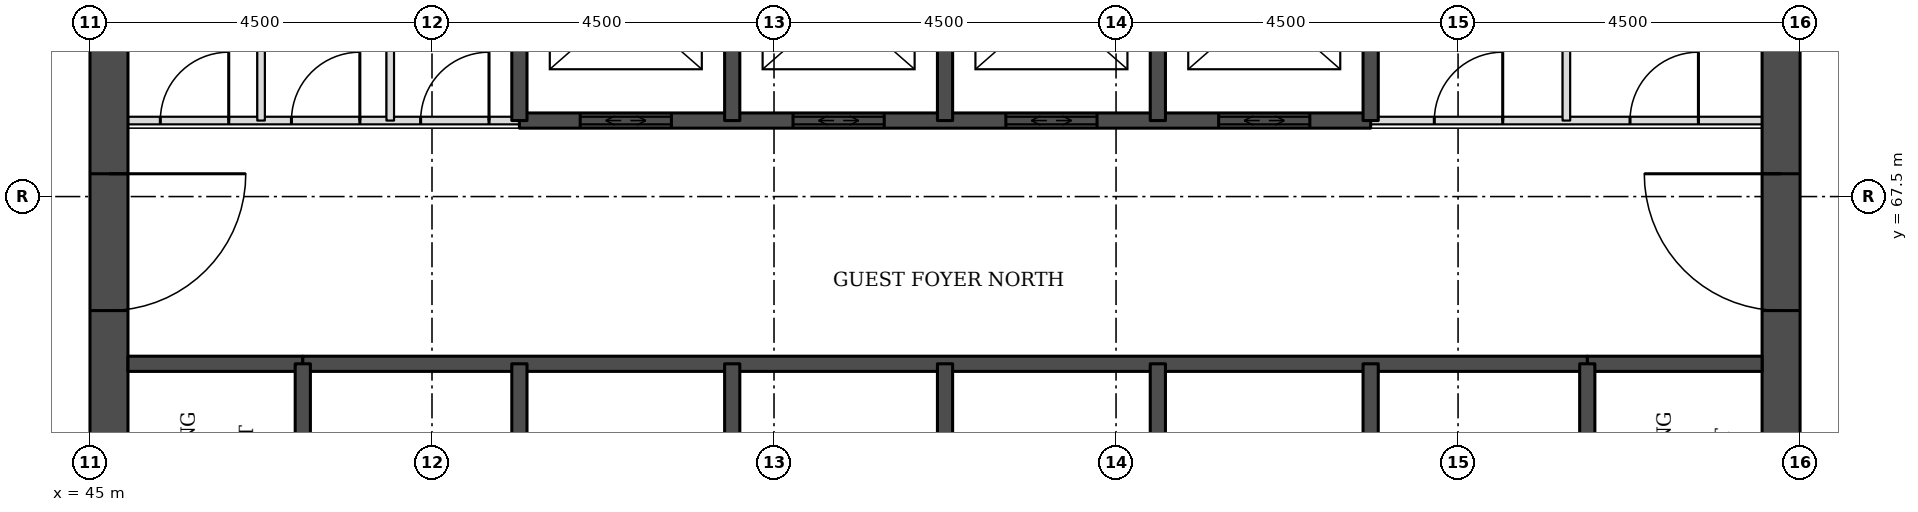
"""IFC4 building model, lengths in metres.
Left out: names, types, materials, properties, quantities, classifications, styles, units other than length and angle.
Written with IfcOpenShell. Run it as: python <this file> out.ifc"""

import sys

from ifc_helpers import new_model, si_unit, direction, frame, frame_2d, origin, place, context, subcontext, project, spatial, rectangle, extrude, element, fill, save


model = new_model("IFC4")
c1 = context("Model", 3, precision=1e-05, world=origin(), true_north=direction((0.0, 1.0)))
c2 = subcontext(c1, "Body", "Model", "MODEL_VIEW")
j1 = project(units=[si_unit("LENGTHUNIT", "METRE"), si_unit("PLANEANGLEUNIT", "RADIAN")], contexts=[c1])
p1 = place(None, origin())
s1 = spatial("IfcSite", under=j1, at=p1, CompositionType="ELEMENT")
p2 = place(p1, origin())
s2 = spatial("IfcBuilding", under=s1, at=p2, CompositionType="ELEMENT")
p3 = place(p2, frame((0.0, 0.0, 49.5)))
s3 = spatial("IfcBuildingStorey", under=s2, at=p3, CompositionType="ELEMENT", Elevation=49.5)
p4 = place(p3, frame((45.25, 49.5, 0.0), z_axis=(0.0, 0.0, 1.0), x_axis=(0.0, 1.0, 0.0)))
e1 = element("IfcWall", 1, at=p4, inside=s3, PredefinedType="SHEAR", context=c2, shape_type="SweptSolid", body=[
    extrude(rectangle(XDim=22.5, YDim=0.5, at=frame_2d((11.25, 0.0))), origin(), (0.0, 0.0, 1.0), 3.3),
])
p5 = place(p4, frame((4.2, 0.0, 0.0)))
e2 = element("IfcOpeningElement", 2, at=p5, cuts=e1, PredefinedType="OPENING", context=c2, shape_type="SweptSolid", body=[
    extrude(rectangle(XDim=1.8, YDim=2.1, at=frame_2d((0.9, 1.05))), frame((0.0, 0.26, 0.0), z_axis=(0.0, -1.0, 0.0), x_axis=(1.0, 0.0, 0.0)), (0.0, 0.0, 1.0), 0.52),
])
p6 = place(p4, frame((6.9, 0.0, 0.0)))
e3 = element("IfcOpeningElement", 3, at=p6, cuts=e1, PredefinedType="OPENING", context=c2, shape_type="SweptSolid", body=[
    extrude(rectangle(XDim=1.1, YDim=2.1, at=frame_2d((0.55, 1.05))), frame((0.0, 0.26, 0.0), z_axis=(0.0, -1.0, 0.0), x_axis=(1.0, 0.0, 0.0)), (0.0, 0.0, 1.0), 0.52),
])
p7 = place(p4, frame((13.6, 0.0, 0.0)))
e4 = element("IfcOpeningElement", 4, at=p7, cuts=e1, PredefinedType="OPENING", context=c2, shape_type="SweptSolid", body=[
    extrude(rectangle(XDim=1.1, YDim=2.1, at=frame_2d((0.55, 1.05))), frame((0.0, 0.26, 0.0), z_axis=(0.0, -1.0, 0.0), x_axis=(1.0, 0.0, 0.0)), (0.0, 0.0, 1.0), 0.52),
])
p8 = place(p4, frame((16.5, 0.0, 0.0)))
e5 = element("IfcOpeningElement", 5, at=p8, cuts=e1, PredefinedType="OPENING", context=c2, shape_type="SweptSolid", body=[
    extrude(rectangle(XDim=1.8, YDim=2.1, at=frame_2d((0.9, 1.05))), frame((0.0, 0.26, 0.0), z_axis=(0.0, -1.0, 0.0), x_axis=(1.0, 0.0, 0.0)), (0.0, 0.0, 1.0), 0.52),
])
p9 = place(p3, frame((67.25, 49.5, 0.0), z_axis=(0.0, 0.0, 1.0), x_axis=(0.0, 1.0, 0.0)))
e6 = element("IfcWall", 6, at=p9, inside=s3, PredefinedType="SHEAR", context=c2, shape_type="SweptSolid", body=[
    extrude(rectangle(XDim=22.5, YDim=0.5, at=frame_2d((11.25, 0.0))), origin(), (0.0, 0.0, 1.0), 3.3),
])
p10 = place(p9, frame((4.2, 0.0, 0.0)))
e7 = element("IfcOpeningElement", 7, at=p10, cuts=e6, PredefinedType="OPENING", context=c2, shape_type="SweptSolid", body=[
    extrude(rectangle(XDim=1.8, YDim=2.1, at=frame_2d((0.9, 1.05))), frame((0.0, 0.26, 0.0), z_axis=(0.0, -1.0, 0.0), x_axis=(1.0, 0.0, 0.0)), (0.0, 0.0, 1.0), 0.52),
])
p11 = place(p9, frame((6.9, 0.0, 0.0)))
e8 = element("IfcOpeningElement", 8, at=p11, cuts=e6, PredefinedType="OPENING", context=c2, shape_type="SweptSolid", body=[
    extrude(rectangle(XDim=1.1, YDim=2.1, at=frame_2d((0.55, 1.05))), frame((0.0, 0.26, 0.0), z_axis=(0.0, -1.0, 0.0), x_axis=(1.0, 0.0, 0.0)), (0.0, 0.0, 1.0), 0.52),
])
p12 = place(p9, frame((13.6, 0.0, 0.0)))
e9 = element("IfcOpeningElement", 9, at=p12, cuts=e6, PredefinedType="OPENING", context=c2, shape_type="SweptSolid", body=[
    extrude(rectangle(XDim=1.1, YDim=2.1, at=frame_2d((0.55, 1.05))), frame((0.0, 0.26, 0.0), z_axis=(0.0, -1.0, 0.0), x_axis=(1.0, 0.0, 0.0)), (0.0, 0.0, 1.0), 0.52),
])
p13 = place(p9, frame((16.5, 0.0, 0.0)))
e10 = element("IfcOpeningElement", 10, at=p13, cuts=e6, PredefinedType="OPENING", context=c2, shape_type="SweptSolid", body=[
    extrude(rectangle(XDim=1.8, YDim=2.1, at=frame_2d((0.9, 1.05))), frame((0.0, 0.26, 0.0), z_axis=(0.0, -1.0, 0.0), x_axis=(1.0, 0.0, 0.0)), (0.0, 0.0, 1.0), 0.52),
])
for number, where, z_axis, x_axis in (
    (11, (45.5, 65.3, 0.0), (0.0, 0.0, 1.0), (1.0, 0.0, 0.0)),
    (12, (64.7, 65.3, 0.0), (0.0, 0.0, 1.0), (1.0, 0.0, 0.0)),
):
    element("IfcWall", number, at=place(p3, frame(where, z_axis=z_axis, x_axis=x_axis)), inside=s3, PredefinedType="SOLIDWALL", context=c2, shape_type="SweptSolid", body=[
        extrude(rectangle(XDim=2.3, YDim=0.2, at=frame_2d((1.15, 0.0))), origin(), (0.0, 0.0, 1.0), 3.08),
    ])
p14 = place(p3, frame((47.8, 65.3, 0.0), z_axis=(0.0, 0.0, 1.0), x_axis=(1.0, 0.0, 0.0)))
e13 = element("IfcWall", 13, at=p14, inside=s3, PredefinedType="SOLIDWALL", context=c2, shape_type="SweptSolid", body=[
    extrude(rectangle(XDim=16.9, YDim=0.2, at=frame_2d((8.45, 0.0))), origin(), (0.0, 0.0, 1.0), 3.08),
])
p15 = place(p3, frame((45.5, 68.5, 0.0), z_axis=(0.0, 0.0, 1.0), x_axis=(1.0, 0.0, 0.0)))
e14 = element("IfcWall", 14, at=p15, inside=s3, PredefinedType="PARTITIONING", context=c2, shape_type="SweptSolid", body=[
    extrude(rectangle(XDim=5.15, YDim=0.1, at=frame_2d((2.575, 0.0))), origin(), (0.0, 0.0, 1.0), 3.08),
])
p16 = place(p15, frame((0.426, 0.0, 0.0)))
e15 = element("IfcOpeningElement", 15, at=p16, cuts=e14, PredefinedType="OPENING", context=c2, shape_type="SweptSolid", body=[
    extrude(rectangle(XDim=0.9, YDim=2.1, at=frame_2d((0.45, 1.05))), frame((0.0, 0.06, 0.0), z_axis=(0.0, -1.0, 0.0), x_axis=(1.0, 0.0, 0.0)), (0.0, 0.0, 1.0), 0.12),
])
p17 = place(p15, frame((2.151, 0.0, 0.0)))
e16 = element("IfcOpeningElement", 16, at=p17, cuts=e14, PredefinedType="OPENING", context=c2, shape_type="SweptSolid", body=[
    extrude(rectangle(XDim=0.9, YDim=2.1, at=frame_2d((0.45, 1.05))), frame((0.0, 0.06, 0.0), z_axis=(0.0, -1.0, 0.0), x_axis=(1.0, 0.0, 0.0)), (0.0, 0.0, 1.0), 0.12),
])
p18 = place(p15, frame((3.85, 0.0, 0.0)))
e17 = element("IfcOpeningElement", 17, at=p18, cuts=e14, PredefinedType="OPENING", context=c2, shape_type="SweptSolid", body=[
    extrude(rectangle(XDim=0.9, YDim=2.1, at=frame_2d((0.45, 1.05))), frame((0.0, 0.06, 0.0), z_axis=(0.0, -1.0, 0.0), x_axis=(1.0, 0.0, 0.0)), (0.0, 0.0, 1.0), 0.12),
])
p19 = place(p3, frame((61.85, 68.5, 0.0), z_axis=(0.0, 0.0, 1.0), x_axis=(1.0, 0.0, 0.0)))
e18 = element("IfcWall", 18, at=p19, inside=s3, PredefinedType="PARTITIONING", context=c2, shape_type="SweptSolid", body=[
    extrude(rectangle(XDim=5.15, YDim=0.1, at=frame_2d((2.575, 0.0))), origin(), (0.0, 0.0, 1.0), 3.08),
])
p20 = place(p19, frame((3.413, 0.0, 0.0)))
e19 = element("IfcOpeningElement", 19, at=p20, cuts=e18, PredefinedType="OPENING", context=c2, shape_type="SweptSolid", body=[
    extrude(rectangle(XDim=0.9, YDim=2.1, at=frame_2d((0.45, 1.05))), frame((0.0, 0.06, 0.0), z_axis=(0.0, -1.0, 0.0), x_axis=(1.0, 0.0, 0.0)), (0.0, 0.0, 1.0), 0.12),
])
p21 = place(p19, frame((0.837, 0.0, 0.0)))
e20 = element("IfcOpeningElement", 20, at=p21, cuts=e18, PredefinedType="OPENING", context=c2, shape_type="SweptSolid", body=[
    extrude(rectangle(XDim=0.9, YDim=2.1, at=frame_2d((0.45, 1.05))), frame((0.0, 0.06, 0.0), z_axis=(0.0, -1.0, 0.0), x_axis=(1.0, 0.0, 0.0)), (0.0, 0.0, 1.0), 0.12),
])
p22 = place(p3, frame((50.65, 68.5, 0.0), z_axis=(0.0, 0.0, 1.0), x_axis=(1.0, 0.0, 0.0)))
e21 = element("IfcWall", 21, at=p22, inside=s3, PredefinedType="SOLIDWALL", context=c2, shape_type="SweptSolid", body=[
    extrude(rectangle(XDim=11.2, YDim=0.2, at=frame_2d((5.6, 0.0))), origin(), (0.0, 0.0, 1.0), 3.08),
])
p23 = place(p22, frame((0.8, 0.0, 0.0)))
e22 = element("IfcOpeningElement", 22, at=p23, cuts=e21, PredefinedType="OPENING", context=c2, shape_type="SweptSolid", body=[
    extrude(rectangle(XDim=1.2, YDim=2.1, at=frame_2d((0.6, 1.05))), frame((0.0, 0.11, 0.0), z_axis=(0.0, -1.0, 0.0), x_axis=(1.0, 0.0, 0.0)), (0.0, 0.0, 1.0), 0.22),
])
p24 = place(p22, frame((3.6, 0.0, 0.0)))
e23 = element("IfcOpeningElement", 23, at=p24, cuts=e21, PredefinedType="OPENING", context=c2, shape_type="SweptSolid", body=[
    extrude(rectangle(XDim=1.2, YDim=2.1, at=frame_2d((0.6, 1.05))), frame((0.0, 0.11, 0.0), z_axis=(0.0, -1.0, 0.0), x_axis=(1.0, 0.0, 0.0)), (0.0, 0.0, 1.0), 0.22),
])
p25 = place(p22, frame((6.4, 0.0, 0.0)))
e24 = element("IfcOpeningElement", 24, at=p25, cuts=e21, PredefinedType="OPENING", context=c2, shape_type="SweptSolid", body=[
    extrude(rectangle(XDim=1.2, YDim=2.1, at=frame_2d((0.6, 1.05))), frame((0.0, 0.11, 0.0), z_axis=(0.0, -1.0, 0.0), x_axis=(1.0, 0.0, 0.0)), (0.0, 0.0, 1.0), 0.22),
])
p26 = place(p22, frame((9.2, 0.0, 0.0)))
e25 = element("IfcOpeningElement", 25, at=p26, cuts=e21, PredefinedType="OPENING", context=c2, shape_type="SweptSolid", body=[
    extrude(rectangle(XDim=1.2, YDim=2.1, at=frame_2d((0.6, 1.05))), frame((0.0, 0.11, 0.0), z_axis=(0.0, -1.0, 0.0), x_axis=(1.0, 0.0, 0.0)), (0.0, 0.0, 1.0), 0.22),
])
p27 = place(p3, frame((47.251, 68.5, 0.0), z_axis=(0.0, 0.0, 1.0), x_axis=(0.0, 1.0, 0.0)))
e26 = element("IfcWall", 26, at=p27, inside=s3, PredefinedType="PARTITIONING", context=c2, shape_type="SweptSolid", body=[
    extrude(rectangle(XDim=3.0, YDim=0.1, at=frame_2d((1.5, 0.0))), origin(), (0.0, 0.0, 1.0), 3.08),
])
p28 = place(p3, frame((47.8, 62.0, 0.0), z_axis=(0.0, 0.0, 1.0), x_axis=(0.0, 1.0, 0.0)))
e27 = element("IfcWall", 27, at=p28, inside=s3, PredefinedType="SOLIDWALL", context=c2, shape_type="SweptSolid", body=[
    extrude(rectangle(XDim=3.3, YDim=0.2, at=frame_2d((1.65, 0.0))), origin(), (0.0, 0.0, 1.0), 3.08),
])
p29 = place(p28, frame((1.1, 0.0, 0.0)))
e28 = element("IfcOpeningElement", 28, at=p29, cuts=e27, PredefinedType="OPENING", context=c2, shape_type="SweptSolid", body=[
    extrude(rectangle(XDim=1.1, YDim=2.1, at=frame_2d((0.55, 1.05))), frame((0.0, 0.11, 0.0), z_axis=(0.0, -1.0, 0.0), x_axis=(1.0, 0.0, 0.0)), (0.0, 0.0, 1.0), 0.22),
])
p30 = place(p3, frame((48.95, 68.5, 0.0), z_axis=(0.0, 0.0, 1.0), x_axis=(0.0, 1.0, 0.0)))
e29 = element("IfcWall", 29, at=p30, inside=s3, PredefinedType="PARTITIONING", context=c2, shape_type="SweptSolid", body=[
    extrude(rectangle(XDim=3.0, YDim=0.1, at=frame_2d((1.5, 0.0))), origin(), (0.0, 0.0, 1.0), 3.08),
])
p31 = place(p3, frame((50.65, 62.0, 0.0), z_axis=(0.0, 0.0, 1.0), x_axis=(0.0, 1.0, 0.0)))
e30 = element("IfcWall", 30, at=p31, inside=s3, PredefinedType="SOLIDWALL", context=c2, shape_type="SweptSolid", body=[
    extrude(rectangle(XDim=3.3, YDim=0.2, at=frame_2d((1.65, 0.0))), origin(), (0.0, 0.0, 1.0), 3.08),
])
p32 = place(p3, frame((50.65, 68.5, 0.0), z_axis=(0.0, 0.0, 1.0), x_axis=(0.0, 1.0, 0.0)))
e31 = element("IfcWall", 31, at=p32, inside=s3, PredefinedType="SOLIDWALL", context=c2, shape_type="SweptSolid", body=[
    extrude(rectangle(XDim=3.0, YDim=0.2, at=frame_2d((1.5, 0.0))), origin(), (0.0, 0.0, 1.0), 3.08),
])
p33 = place(p3, frame((53.45, 62.5, 0.0), z_axis=(0.0, 0.0, 1.0), x_axis=(0.0, 1.0, 0.0)))
e32 = element("IfcWall", 32, at=p33, inside=s3, PredefinedType="SOLIDWALL", context=c2, shape_type="SweptSolid", body=[
    extrude(rectangle(XDim=2.8, YDim=0.2, at=frame_2d((1.4, 0.0))), origin(), (0.0, 0.0, 1.0), 3.08),
])
p34 = place(p3, frame((53.45, 68.5, 0.0), z_axis=(0.0, 0.0, 1.0), x_axis=(0.0, 1.0, 0.0)))
e33 = element("IfcWall", 33, at=p34, inside=s3, PredefinedType="SOLIDWALL", context=c2, shape_type="SweptSolid", body=[
    extrude(rectangle(XDim=3.0, YDim=0.2, at=frame_2d((1.5, 0.0))), origin(), (0.0, 0.0, 1.0), 3.08),
])
p35 = place(p3, frame((56.25, 62.5, 0.0), z_axis=(0.0, 0.0, 1.0), x_axis=(0.0, 1.0, 0.0)))
e34 = element("IfcWall", 34, at=p35, inside=s3, PredefinedType="SOLIDWALL", context=c2, shape_type="SweptSolid", body=[
    extrude(rectangle(XDim=2.8, YDim=0.2, at=frame_2d((1.4, 0.0))), origin(), (0.0, 0.0, 1.0), 3.08),
])
p36 = place(p3, frame((56.25, 68.5, 0.0), z_axis=(0.0, 0.0, 1.0), x_axis=(0.0, 1.0, 0.0)))
e35 = element("IfcWall", 35, at=p36, inside=s3, PredefinedType="SOLIDWALL", context=c2, shape_type="SweptSolid", body=[
    extrude(rectangle(XDim=3.0, YDim=0.2, at=frame_2d((1.5, 0.0))), origin(), (0.0, 0.0, 1.0), 3.08),
])
p37 = place(p3, frame((59.05, 62.5, 0.0), z_axis=(0.0, 0.0, 1.0), x_axis=(0.0, 1.0, 0.0)))
e36 = element("IfcWall", 36, at=p37, inside=s3, PredefinedType="SOLIDWALL", context=c2, shape_type="SweptSolid", body=[
    extrude(rectangle(XDim=2.8, YDim=0.2, at=frame_2d((1.4, 0.0))), origin(), (0.0, 0.0, 1.0), 3.08),
])
p38 = place(p3, frame((59.05, 68.5, 0.0), z_axis=(0.0, 0.0, 1.0), x_axis=(0.0, 1.0, 0.0)))
e37 = element("IfcWall", 37, at=p38, inside=s3, PredefinedType="SOLIDWALL", context=c2, shape_type="SweptSolid", body=[
    extrude(rectangle(XDim=3.0, YDim=0.2, at=frame_2d((1.5, 0.0))), origin(), (0.0, 0.0, 1.0), 3.08),
])
p39 = place(p3, frame((61.85, 62.0, 0.0), z_axis=(0.0, 0.0, 1.0), x_axis=(0.0, 1.0, 0.0)))
e38 = element("IfcWall", 38, at=p39, inside=s3, PredefinedType="SOLIDWALL", context=c2, shape_type="SweptSolid", body=[
    extrude(rectangle(XDim=3.3, YDim=0.2, at=frame_2d((1.65, 0.0))), origin(), (0.0, 0.0, 1.0), 3.08),
])
p40 = place(p3, frame((61.85, 68.5, 0.0), z_axis=(0.0, 0.0, 1.0), x_axis=(0.0, 1.0, 0.0)))
e39 = element("IfcWall", 39, at=p40, inside=s3, PredefinedType="SOLIDWALL", context=c2, shape_type="SweptSolid", body=[
    extrude(rectangle(XDim=3.0, YDim=0.2, at=frame_2d((1.5, 0.0))), origin(), (0.0, 0.0, 1.0), 3.08),
])
p41 = place(p3, frame((64.425, 68.5, 0.0), z_axis=(0.0, 0.0, 1.0), x_axis=(0.0, 1.0, 0.0)))
e40 = element("IfcWall", 40, at=p41, inside=s3, PredefinedType="PARTITIONING", context=c2, shape_type="SweptSolid", body=[
    extrude(rectangle(XDim=3.0, YDim=0.1, at=frame_2d((1.5, 0.0))), origin(), (0.0, 0.0, 1.0), 3.08),
])
p42 = place(p3, frame((64.7, 62.0, 0.0), z_axis=(0.0, 0.0, 1.0), x_axis=(0.0, 1.0, 0.0)))
e41 = element("IfcWall", 41, at=p42, inside=s3, PredefinedType="SOLIDWALL", context=c2, shape_type="SweptSolid", body=[
    extrude(rectangle(XDim=3.3, YDim=0.2, at=frame_2d((1.65, 0.0))), origin(), (0.0, 0.0, 1.0), 3.08),
])
p43 = place(p42, frame((1.1, 0.0, 0.0)))
e42 = element("IfcOpeningElement", 42, at=p43, cuts=e41, PredefinedType="OPENING", context=c2, shape_type="SweptSolid", body=[
    extrude(rectangle(XDim=1.1, YDim=2.1, at=frame_2d((0.55, 1.05))), frame((0.0, 0.11, 0.0), z_axis=(0.0, -1.0, 0.0), x_axis=(1.0, 0.0, 0.0)), (0.0, 0.0, 1.0), 0.22),
])
p44 = place(p23, origin())
e43 = element("IfcDoor", 43, at=p44, inside=s3, OperationType="DOUBLE_DOOR_SLIDING", PredefinedType="DOOR", context=c2, shape_type="SweptSolid", body=[
    extrude(rectangle(XDim=1.2, YDim=2.1, at=frame_2d((0.6, 1.05))), frame((0.0, 0.025, 0.0), z_axis=(0.0, -1.0, 0.0), x_axis=(1.0, 0.0, 0.0)), (0.0, 0.0, 1.0), 0.05),
])
fill(e22, e43)
p45 = place(p24, origin())
e44 = element("IfcDoor", 44, at=p45, inside=s3, OperationType="DOUBLE_DOOR_SLIDING", PredefinedType="DOOR", context=c2, shape_type="SweptSolid", body=[
    extrude(rectangle(XDim=1.2, YDim=2.1, at=frame_2d((0.6, 1.05))), frame((0.0, 0.025, 0.0), z_axis=(0.0, -1.0, 0.0), x_axis=(1.0, 0.0, 0.0)), (0.0, 0.0, 1.0), 0.05),
])
fill(e23, e44)
p46 = place(p25, origin())
e45 = element("IfcDoor", 45, at=p46, inside=s3, OperationType="DOUBLE_DOOR_SLIDING", PredefinedType="DOOR", context=c2, shape_type="SweptSolid", body=[
    extrude(rectangle(XDim=1.2, YDim=2.1, at=frame_2d((0.6, 1.05))), frame((0.0, 0.025, 0.0), z_axis=(0.0, -1.0, 0.0), x_axis=(1.0, 0.0, 0.0)), (0.0, 0.0, 1.0), 0.05),
])
fill(e24, e45)
p47 = place(p26, origin())
e46 = element("IfcDoor", 46, at=p47, inside=s3, OperationType="DOUBLE_DOOR_SLIDING", PredefinedType="DOOR", context=c2, shape_type="SweptSolid", body=[
    extrude(rectangle(XDim=1.2, YDim=2.1, at=frame_2d((0.6, 1.05))), frame((0.0, 0.025, 0.0), z_axis=(0.0, -1.0, 0.0), x_axis=(1.0, 0.0, 0.0)), (0.0, 0.0, 1.0), 0.05),
])
fill(e25, e46)
p48 = place(p8, frame((1.8, 0.0, 0.0), z_axis=(0.0, 0.0, 1.0), x_axis=(-1.0, 0.0, 0.0)))
e47 = element("IfcDoor", 47, at=p48, inside=s3, OperationType="SINGLE_SWING_LEFT", PredefinedType="DOOR", context=c2, shape_type="SweptSolid", body=[
    extrude(rectangle(XDim=1.8, YDim=2.1, at=frame_2d((0.9, 1.05))), frame((0.0, 0.025, 0.0), z_axis=(0.0, -1.0, 0.0), x_axis=(1.0, 0.0, 0.0)), (0.0, 0.0, 1.0), 0.05),
])
fill(e5, e47)
p49 = place(p13, origin())
e48 = element("IfcDoor", 48, at=p49, inside=s3, OperationType="SINGLE_SWING_RIGHT", PredefinedType="DOOR", context=c2, shape_type="SweptSolid", body=[
    extrude(rectangle(XDim=1.8, YDim=2.1, at=frame_2d((0.9, 1.05))), frame((0.0, 0.025, 0.0), z_axis=(0.0, -1.0, 0.0), x_axis=(1.0, 0.0, 0.0)), (0.0, 0.0, 1.0), 0.05),
])
fill(e10, e48)
p50 = place(p20, origin())
e49 = element("IfcDoor", 49, at=p50, inside=s3, OperationType="SINGLE_SWING_RIGHT", PredefinedType="DOOR", context=c2, shape_type="SweptSolid", body=[
    extrude(rectangle(XDim=0.9, YDim=2.1, at=frame_2d((0.45, 1.05))), frame((0.0, 0.025, 0.0), z_axis=(0.0, -1.0, 0.0), x_axis=(1.0, 0.0, 0.0)), (0.0, 0.0, 1.0), 0.05),
])
fill(e19, e49)
p51 = place(p21, origin())
e50 = element("IfcDoor", 50, at=p51, inside=s3, OperationType="SINGLE_SWING_RIGHT", PredefinedType="DOOR", context=c2, shape_type="SweptSolid", body=[
    extrude(rectangle(XDim=0.9, YDim=2.1, at=frame_2d((0.45, 1.05))), frame((0.0, 0.025, 0.0), z_axis=(0.0, -1.0, 0.0), x_axis=(1.0, 0.0, 0.0)), (0.0, 0.0, 1.0), 0.05),
])
fill(e20, e50)
p52 = place(p16, origin())
e51 = element("IfcDoor", 51, at=p52, inside=s3, OperationType="SINGLE_SWING_RIGHT", PredefinedType="DOOR", context=c2, shape_type="SweptSolid", body=[
    extrude(rectangle(XDim=0.9, YDim=2.1, at=frame_2d((0.45, 1.05))), frame((0.0, 0.025, 0.0), z_axis=(0.0, -1.0, 0.0), x_axis=(1.0, 0.0, 0.0)), (0.0, 0.0, 1.0), 0.05),
])
fill(e15, e51)
p53 = place(p17, origin())
e52 = element("IfcDoor", 52, at=p53, inside=s3, OperationType="SINGLE_SWING_RIGHT", PredefinedType="DOOR", context=c2, shape_type="SweptSolid", body=[
    extrude(rectangle(XDim=0.9, YDim=2.1, at=frame_2d((0.45, 1.05))), frame((0.0, 0.025, 0.0), z_axis=(0.0, -1.0, 0.0), x_axis=(1.0, 0.0, 0.0)), (0.0, 0.0, 1.0), 0.05),
])
fill(e16, e52)
p54 = place(p18, origin())
e53 = element("IfcDoor", 53, at=p54, inside=s3, OperationType="SINGLE_SWING_RIGHT", PredefinedType="DOOR", context=c2, shape_type="SweptSolid", body=[
    extrude(rectangle(XDim=0.9, YDim=2.1, at=frame_2d((0.45, 1.05))), frame((0.0, 0.025, 0.0), z_axis=(0.0, -1.0, 0.0), x_axis=(1.0, 0.0, 0.0)), (0.0, 0.0, 1.0), 0.05),
])
fill(e17, e53)
save(model, sys.argv[1])
